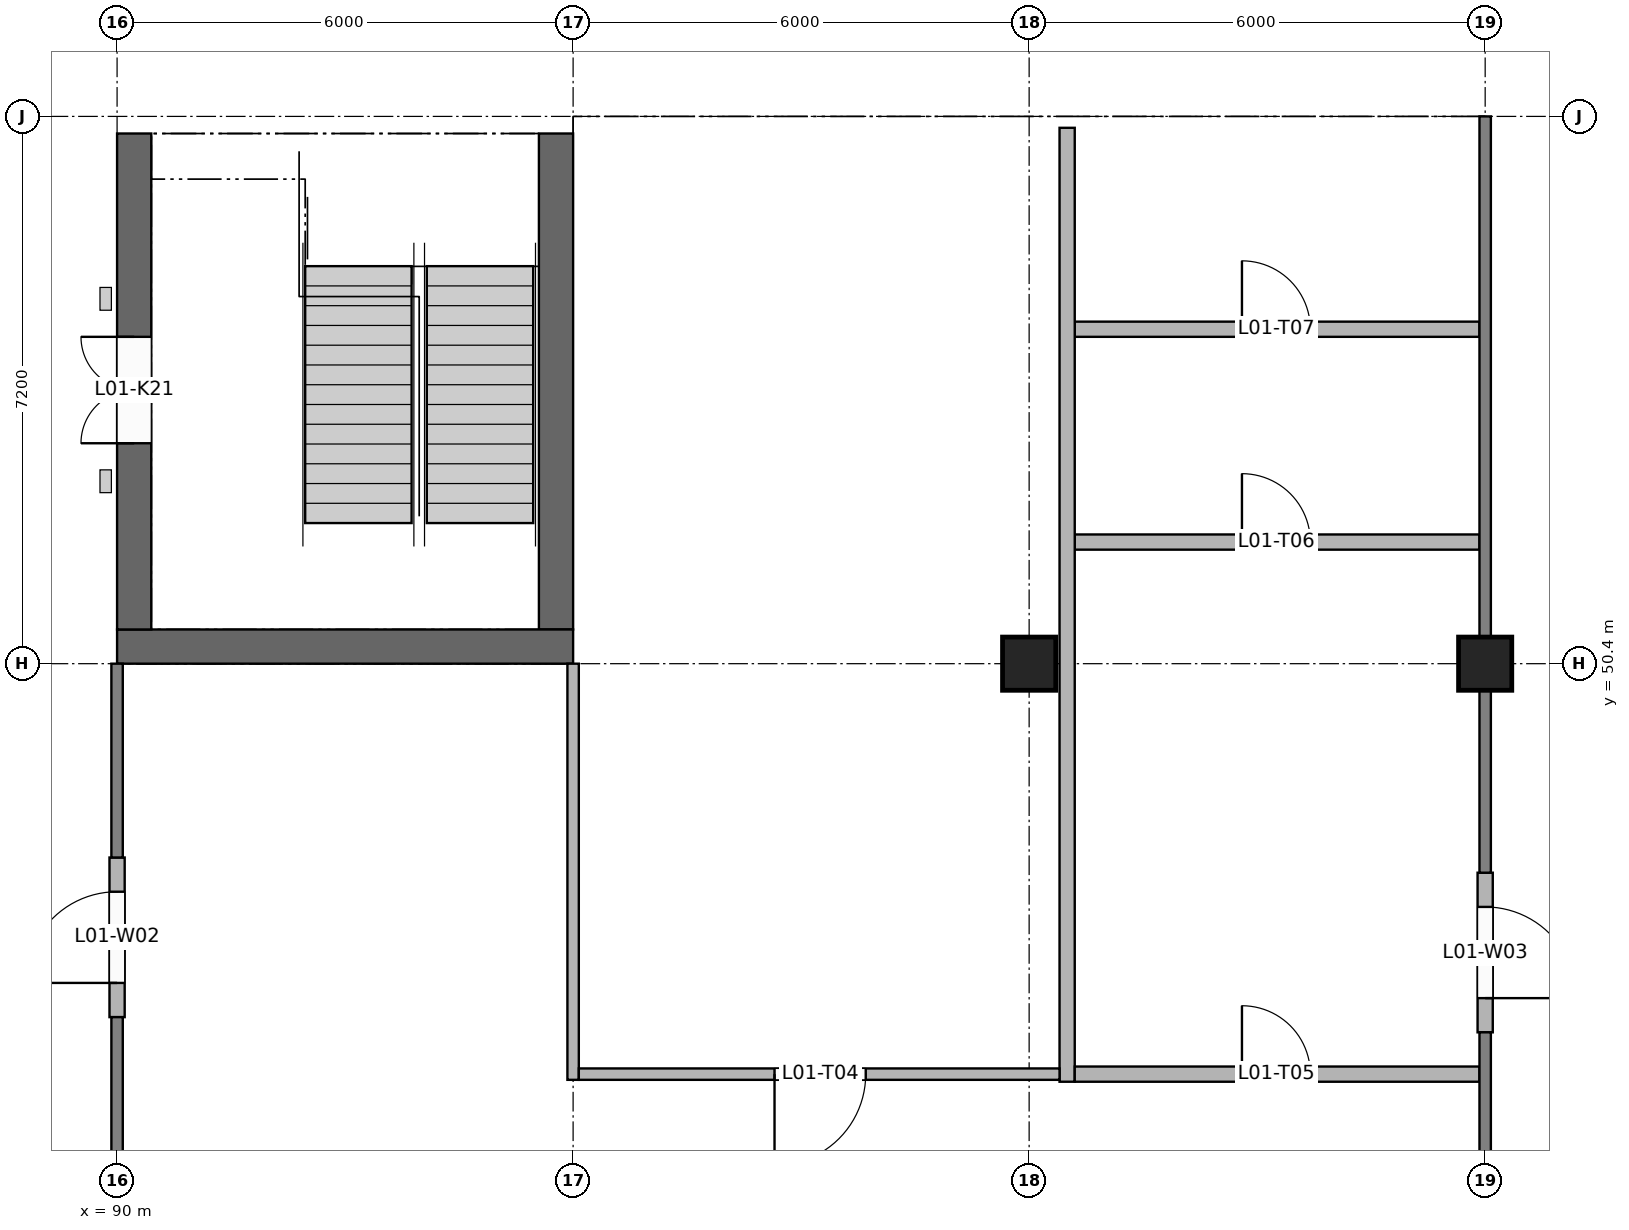
"""IFC4 building model, lengths in metres.
Left out: names, types, materials, properties, quantities, classifications, styles, units other than length and angle.
Written with IfcOpenShell. Run it as: python <this file> out.ifc"""

import sys

from ifc_helpers import new_model, si_unit, direction, frame, frame_2d, origin, origin_2d, place, context, subcontext, project, spatial, rectangle, extrude, element, fill, save


model = new_model("IFC4")
c1 = context("Model", 3, precision=1e-05, world=origin(), true_north=direction((0.0, 1.0)))
c2 = subcontext(c1, "Body", "Model", "MODEL_VIEW")
j1 = project(units=[si_unit("LENGTHUNIT", "METRE"), si_unit("PLANEANGLEUNIT", "RADIAN")], contexts=[c1])
p1 = place(None, origin())
s1 = spatial("IfcSite", under=j1, at=p1, CompositionType="ELEMENT")
p2 = place(p1, origin())
s2 = spatial("IfcBuilding", under=s1, at=p2, CompositionType="ELEMENT")
p3 = place(p2, frame((0.0, 0.0, 4.2)))
s3 = spatial("IfcBuildingStorey", under=s2, at=p3, CompositionType="ELEMENT", Elevation=4.2)
p4 = place(p3, frame((90.0, 50.625, 0.0), z_axis=(0.0, 0.0, 1.0), x_axis=(1.0, 0.0, 0.0)))
e1 = element("IfcWall", 1, at=p4, inside=s3, PredefinedType="SHEAR", context=c2, shape_type="SweptSolid", body=[
    extrude(rectangle(XDim=6.0, YDim=0.45, at=frame_2d((3.0, 0.0))), origin(), (0.0, 0.0, 1.0), 3.95),
])
p5 = place(p4, frame((2.4, 0.0, 0.0)))
e2 = element("IfcOpeningElement", 2, at=p5, cuts=e1, PredefinedType="OPENING", context=c2, shape_type="SweptSolid", body=[
    extrude(rectangle(XDim=1.2, YDim=2.1, at=frame_2d((0.6, 1.05))), frame((0.0, 0.235, 0.0), z_axis=(0.0, -1.0, 0.0), x_axis=(1.0, 0.0, 0.0)), (0.0, 0.0, 1.0), 0.47),
])
p6 = place(p3, frame((90.225, 50.85, 0.0), z_axis=(0.0, 0.0, 1.0), x_axis=(0.0, 1.0, 0.0)))
e3 = element("IfcWall", 3, at=p6, inside=s3, PredefinedType="SHEAR", context=c2, shape_type="SweptSolid", body=[
    extrude(rectangle(XDim=6.525, YDim=0.45, at=frame_2d((3.262, 0.0))), origin(), (0.0, 0.0, 1.0), 3.95),
])
p7 = place(p6, frame((2.45, 0.0, 0.0)))
e4 = element("IfcOpeningElement", 4, at=p7, cuts=e3, PredefinedType="OPENING", context=c2, shape_type="SweptSolid", body=[
    extrude(rectangle(XDim=1.4, YDim=2.1, at=frame_2d((0.7, 1.05))), frame((0.0, 0.235, 0.0), z_axis=(0.0, -1.0, 0.0), x_axis=(1.0, 0.0, 0.0)), (0.0, 0.0, 1.0), 0.47),
])
p8 = place(p3, frame((95.775, 50.85, 0.0), z_axis=(0.0, 0.0, 1.0), x_axis=(0.0, 1.0, 0.0)))
e5 = element("IfcWall", 5, at=p8, inside=s3, PredefinedType="SHEAR", context=c2, shape_type="SweptSolid", body=[
    extrude(rectangle(XDim=6.525, YDim=0.45, at=frame_2d((3.262, 0.0))), origin(), (0.0, 0.0, 1.0), 3.95),
])
p9 = place(p3, frame((90.0, 50.625, -0.2), z_axis=(0.0, 0.0, 1.0), x_axis=(1.0, 0.0, 0.0)))
e6 = element("IfcWall", 6, at=p9, inside=s3, PredefinedType="SOLIDWALL", context=c2, shape_type="SweptSolid", body=[
    extrude(rectangle(XDim=6.0, YDim=0.45, at=frame_2d((3.0, 0.0))), origin(), (0.0, 0.0, 1.0), 0.2),
])
p10 = place(p3, frame((95.775, 50.85, -0.2), z_axis=(0.0, 0.0, 1.0), x_axis=(0.0, 1.0, 0.0)))
e7 = element("IfcWall", 7, at=p10, inside=s3, PredefinedType="SOLIDWALL", context=c2, shape_type="SweptSolid", body=[
    extrude(rectangle(XDim=6.525, YDim=0.45, at=frame_2d((3.262, 0.0))), origin(), (0.0, 0.0, 1.0), 0.2),
])
for number, where, z_axis, x_axis in (
    (8, (102.0, 50.4, 0.0), (0.0, 0.0, 1.0), (1.0, 0.0, 0.0)),
    (9, (108.0, 50.4, 0.0), (0.0, 0.0, 1.0), (1.0, 0.0, 0.0)),
):
    element("IfcColumn", number, at=place(p3, frame(where, z_axis=z_axis, x_axis=x_axis)), inside=s3, PredefinedType="COLUMN", context=c2, shape_type="SweptSolid", body=[
        extrude(rectangle(XDim=0.7, YDim=0.7, at=origin_2d()), origin(), (0.0, 0.0, 1.0), 3.95),
    ])
p11 = place(p3, frame((84.0, 57.6, -0.25), z_axis=(0.0, 0.0, 1.0), x_axis=(1.0, 0.0, 0.0)))
e10 = element("IfcWall", 10, at=p11, inside=s3, PredefinedType="SOLIDWALL", context=c2, shape_type="SweptSolid", body=[
    extrude(rectangle(XDim=6.0, YDim=0.45, at=frame_2d((3.0, 0.0))), origin(), (0.0, 0.0, 1.0), 4.45),
])
p12 = place(p3, frame((90.0, 57.6, -0.25), z_axis=(0.0, 0.0, 1.0), x_axis=(1.0, 0.0, 0.0)))
e11 = element("IfcWall", 11, at=p12, inside=s3, PredefinedType="SOLIDWALL", context=c2, shape_type="SweptSolid", body=[
    extrude(rectangle(XDim=18.0, YDim=0.45, at=frame_2d((9.0, 0.0))), origin(), (0.0, 0.0, 1.0), 4.2),
])
p13 = place(p3, frame((108.0, 57.6, -0.25), z_axis=(0.0, 0.0, 1.0), x_axis=(1.0, 0.0, 0.0)))
e12 = element("IfcWall", 12, at=p13, inside=s3, PredefinedType="SOLIDWALL", context=c2, shape_type="SweptSolid", body=[
    extrude(rectangle(XDim=21.0, YDim=0.45, at=frame_2d((10.5, 0.0))), origin(), (0.0, 0.0, 1.0), 4.45),
])
p14 = place(p3, frame((90.0, 45.75, 0.0), z_axis=(0.0, 0.0, 1.0), x_axis=(0.0, 1.0, 0.0)))
e13 = element("IfcWall", 13, at=p14, inside=s3, PredefinedType="SOLIDWALL", context=c2, shape_type="SweptSolid", body=[
    extrude(rectangle(XDim=2.1, YDim=0.2, at=frame_2d((1.05, 0.0))), origin(), (0.0, 0.0, 1.0), 3.05),
])
p15 = place(p14, frame((0.45, 0.0, 0.0)))
e14 = element("IfcOpeningElement", 14, at=p15, cuts=e13, PredefinedType="OPENING", context=c2, shape_type="SweptSolid", body=[
    extrude(rectangle(XDim=1.2, YDim=2.4, at=frame_2d((0.6, 1.2))), frame((0.0, 0.11, 0.0), z_axis=(0.0, -1.0, 0.0), x_axis=(1.0, 0.0, 0.0)), (0.0, 0.0, 1.0), 0.22),
])
p16 = place(p3, frame((108.0, 45.55, 0.0), z_axis=(0.0, 0.0, 1.0), x_axis=(0.0, 1.0, 0.0)))
e15 = element("IfcWall", 15, at=p16, inside=s3, PredefinedType="SOLIDWALL", context=c2, shape_type="SweptSolid", body=[
    extrude(rectangle(XDim=2.1, YDim=0.2, at=frame_2d((1.05, 0.0))), origin(), (0.0, 0.0, 1.0), 3.05),
])
p17 = place(p16, frame((0.45, 0.0, 0.0)))
e16 = element("IfcOpeningElement", 16, at=p17, cuts=e15, PredefinedType="OPENING", context=c2, shape_type="SweptSolid", body=[
    extrude(rectangle(XDim=1.2, YDim=2.4, at=frame_2d((0.6, 1.2))), frame((0.0, 0.11, 0.0), z_axis=(0.0, -1.0, 0.0), x_axis=(1.0, 0.0, 0.0)), (0.0, 0.0, 1.0), 0.22),
])
p18 = place(p3, frame((96.0, 44.925, 0.0), z_axis=(0.0, 0.0, 1.0), x_axis=(0.0, 1.0, 0.0)))
e17 = element("IfcWall", 17, at=p18, inside=s3, PredefinedType="PARTITIONING", context=c2, shape_type="SweptSolid", body=[
    extrude(rectangle(XDim=5.475, YDim=0.15, at=frame_2d((2.737, 0.0))), origin(), (0.0, 0.0, 1.0), 3.95),
])
p19 = place(p3, frame((102.5, 44.9, 0.0), z_axis=(0.0, 0.0, 1.0), x_axis=(0.0, 1.0, 0.0)))
e18 = element("IfcWall", 18, at=p19, inside=s3, PredefinedType="PARTITIONING", context=c2, shape_type="SweptSolid", body=[
    extrude(rectangle(XDim=12.55, YDim=0.2, at=frame_2d((6.275, 0.0))), origin(), (0.0, 0.0, 1.0), 3.25),
])
p20 = place(p3, frame((96.075, 45.0, 0.0), z_axis=(0.0, 0.0, 1.0), x_axis=(1.0, 0.0, 0.0)))
e19 = element("IfcWall", 19, at=p20, inside=s3, PredefinedType="PARTITIONING", context=c2, shape_type="SweptSolid", body=[
    extrude(rectangle(XDim=6.325, YDim=0.15, at=frame_2d((3.163, 0.0))), origin(), (0.0, 0.0, 1.0), 3.95),
])
p21 = place(p20, frame((2.575, 0.0, 0.0)))
e20 = element("IfcOpeningElement", 20, at=p21, cuts=e19, PredefinedType="OPENING", context=c2, shape_type="SweptSolid", body=[
    extrude(rectangle(XDim=1.2, YDim=2.1, at=frame_2d((0.6, 1.05))), frame((0.0, 0.085, 0.0), z_axis=(0.0, -1.0, 0.0), x_axis=(1.0, 0.0, 0.0)), (0.0, 0.0, 1.0), 0.17),
])
p22 = place(p3, frame((102.6, 45.0, 0.0), z_axis=(0.0, 0.0, 1.0), x_axis=(1.0, 0.0, 0.0)))
e21 = element("IfcWall", 21, at=p22, inside=s3, PredefinedType="PARTITIONING", context=c2, shape_type="SweptSolid", body=[
    extrude(rectangle(XDim=5.325, YDim=0.2, at=frame_2d((2.663, 0.0))), origin(), (0.0, 0.0, 1.0), 3.95),
])
p23 = place(p22, frame((2.2, 0.0, 0.0)))
e22 = element("IfcOpeningElement", 22, at=p23, cuts=e21, PredefinedType="OPENING", context=c2, shape_type="SweptSolid", body=[
    extrude(rectangle(XDim=0.9, YDim=2.1, at=frame_2d((0.45, 1.05))), frame((0.0, 0.11, 0.0), z_axis=(0.0, -1.0, 0.0), x_axis=(1.0, 0.0, 0.0)), (0.0, 0.0, 1.0), 0.22),
])
p24 = place(p3, frame((102.6, 52.0, 0.0), z_axis=(0.0, 0.0, 1.0), x_axis=(1.0, 0.0, 0.0)))
e23 = element("IfcWall", 23, at=p24, inside=s3, PredefinedType="PARTITIONING", context=c2, shape_type="SweptSolid", body=[
    extrude(rectangle(XDim=5.325, YDim=0.2, at=frame_2d((2.663, 0.0))), origin(), (0.0, 0.0, 1.0), 3.15),
])
p25 = place(p24, frame((2.2, 0.0, 0.0)))
e24 = element("IfcOpeningElement", 24, at=p25, cuts=e23, PredefinedType="OPENING", context=c2, shape_type="SweptSolid", body=[
    extrude(rectangle(XDim=0.9, YDim=2.1, at=frame_2d((0.45, 1.05))), frame((0.0, 0.11, 0.0), z_axis=(0.0, -1.0, 0.0), x_axis=(1.0, 0.0, 0.0)), (0.0, 0.0, 1.0), 0.22),
])
p26 = place(p3, frame((102.6, 54.8, 0.0), z_axis=(0.0, 0.0, 1.0), x_axis=(1.0, 0.0, 0.0)))
e25 = element("IfcWall", 25, at=p26, inside=s3, PredefinedType="PARTITIONING", context=c2, shape_type="SweptSolid", body=[
    extrude(rectangle(XDim=5.325, YDim=0.2, at=frame_2d((2.663, 0.0))), origin(), (0.0, 0.0, 1.0), 3.15),
])
p27 = place(p26, frame((2.2, 0.0, 0.0)))
e26 = element("IfcOpeningElement", 26, at=p27, cuts=e25, PredefinedType="OPENING", context=c2, shape_type="SweptSolid", body=[
    extrude(rectangle(XDim=0.9, YDim=2.1, at=frame_2d((0.45, 1.05))), frame((0.0, 0.11, 0.0), z_axis=(0.0, -1.0, 0.0), x_axis=(1.0, 0.0, 0.0)), (0.0, 0.0, 1.0), 0.22),
])
p28 = place(p15, origin())
e27 = element("IfcDoor", 27, at=p28, inside=s3, OperationType="SINGLE_SWING_LEFT", PredefinedType="DOOR", context=c2, shape_type="SweptSolid", body=[
    extrude(rectangle(XDim=1.2, YDim=2.4, at=frame_2d((0.6, 1.2))), frame((0.0, 0.025, 0.0), z_axis=(0.0, -1.0, 0.0), x_axis=(1.0, 0.0, 0.0)), (0.0, 0.0, 1.0), 0.05),
])
fill(e14, e27)
p29 = place(p17, frame((1.2, 0.0, 0.0), z_axis=(0.0, 0.0, 1.0), x_axis=(-1.0, 0.0, 0.0)))
e28 = element("IfcDoor", 28, at=p29, inside=s3, OperationType="SINGLE_SWING_RIGHT", PredefinedType="DOOR", context=c2, shape_type="SweptSolid", body=[
    extrude(rectangle(XDim=1.2, YDim=2.4, at=frame_2d((0.6, 1.2))), frame((0.0, 0.025, 0.0), z_axis=(0.0, -1.0, 0.0), x_axis=(1.0, 0.0, 0.0)), (0.0, 0.0, 1.0), 0.05),
])
fill(e16, e28)
p30 = place(p5, frame((1.2, 0.0, 0.0), z_axis=(0.0, 0.0, 1.0), x_axis=(-1.0, 0.0, 0.0)))
e29 = element("IfcDoor", 29, at=p30, inside=s3, OperationType="SINGLE_SWING_LEFT", PredefinedType="DOOR", context=c2, shape_type="SweptSolid", body=[
    extrude(rectangle(XDim=1.2, YDim=2.1, at=frame_2d((0.6, 1.05))), frame((0.0, 0.025, 0.0), z_axis=(0.0, -1.0, 0.0), x_axis=(1.0, 0.0, 0.0)), (0.0, 0.0, 1.0), 0.05),
])
fill(e2, e29)
p31 = place(p7, origin())
e30 = element("IfcDoor", 30, at=p31, inside=s3, OperationType="DOUBLE_DOOR_SINGLE_SWING", PredefinedType="DOOR", context=c2, shape_type="SweptSolid", body=[
    extrude(rectangle(XDim=1.4, YDim=2.1, at=frame_2d((0.7, 1.05))), frame((0.0, 0.025, 0.0), z_axis=(0.0, -1.0, 0.0), x_axis=(1.0, 0.0, 0.0)), (0.0, 0.0, 1.0), 0.05),
])
fill(e4, e30)
p32 = place(p21, frame((1.2, 0.0, 0.0), z_axis=(0.0, 0.0, 1.0), x_axis=(-1.0, 0.0, 0.0)))
e31 = element("IfcDoor", 31, at=p32, inside=s3, OperationType="SINGLE_SWING_RIGHT", PredefinedType="DOOR", context=c2, shape_type="SweptSolid", body=[
    extrude(rectangle(XDim=1.2, YDim=2.1, at=frame_2d((0.6, 1.05))), frame((0.0, 0.025, 0.0), z_axis=(0.0, -1.0, 0.0), x_axis=(1.0, 0.0, 0.0)), (0.0, 0.0, 1.0), 0.05),
])
fill(e20, e31)
p33 = place(p23, origin())
e32 = element("IfcDoor", 32, at=p33, inside=s3, OperationType="SINGLE_SWING_LEFT", PredefinedType="DOOR", context=c2, shape_type="SweptSolid", body=[
    extrude(rectangle(XDim=0.9, YDim=2.1, at=frame_2d((0.45, 1.05))), frame((0.0, 0.025, 0.0), z_axis=(0.0, -1.0, 0.0), x_axis=(1.0, 0.0, 0.0)), (0.0, 0.0, 1.0), 0.05),
])
fill(e22, e32)
p34 = place(p25, origin())
e33 = element("IfcDoor", 33, at=p34, inside=s3, OperationType="SINGLE_SWING_LEFT", PredefinedType="DOOR", context=c2, shape_type="SweptSolid", body=[
    extrude(rectangle(XDim=0.9, YDim=2.1, at=frame_2d((0.45, 1.05))), frame((0.0, 0.025, 0.0), z_axis=(0.0, -1.0, 0.0), x_axis=(1.0, 0.0, 0.0)), (0.0, 0.0, 1.0), 0.05),
])
fill(e24, e33)
p35 = place(p27, origin())
e34 = element("IfcDoor", 34, at=p35, inside=s3, OperationType="SINGLE_SWING_LEFT", PredefinedType="DOOR", context=c2, shape_type="SweptSolid", body=[
    extrude(rectangle(XDim=0.9, YDim=2.1, at=frame_2d((0.45, 1.05))), frame((0.0, 0.025, 0.0), z_axis=(0.0, -1.0, 0.0), x_axis=(1.0, 0.0, 0.0)), (0.0, 0.0, 1.0), 0.05),
])
fill(e26, e34)
save(model, sys.argv[1])
